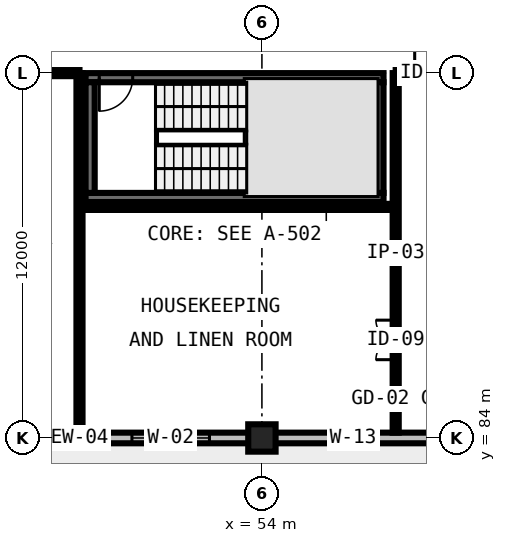
"""IFC4 building model, lengths in metres.
Left out: names, types, materials, properties, quantities, classifications, styles, units other than length and angle.
Written with IfcOpenShell. Run it as: python <this file> out.ifc"""

import sys

from ifc_helpers import new_model, si_unit, direction, frame, frame_2d, origin, origin_2d, place, context, subcontext, project, spatial, rectangle, extrude, element, fill, save


model = new_model("IFC4")
c1 = context("Model", 3, precision=1e-05, world=origin(), true_north=direction((0.0, 1.0)))
c2 = subcontext(c1, "Body", "Model", "MODEL_VIEW")
j1 = project(units=[si_unit("LENGTHUNIT", "METRE"), si_unit("PLANEANGLEUNIT", "RADIAN")], contexts=[c1])
p1 = place(None, origin())
s1 = spatial("IfcSite", under=j1, at=p1, CompositionType="ELEMENT")
p2 = place(p1, origin())
s2 = spatial("IfcBuilding", under=s1, at=p2, CompositionType="ELEMENT")
p3 = place(p2, frame((0.0, 0.0, 27.6)))
s3 = spatial("IfcBuildingStorey", under=s2, at=p3, CompositionType="ELEMENT", Elevation=27.6)
p4 = place(p3, frame((54.0, 84.0, 0.0), z_axis=(0.0, 0.0, 1.0), x_axis=(1.0, 0.0, 0.0)))
e1 = element("IfcColumn", 1, at=p4, inside=s3, PredefinedType="COLUMN", context=c2, shape_type="SweptSolid", body=[
    extrude(rectangle(XDim=0.9, YDim=0.9, at=origin_2d()), origin(), (0.0, 0.0, 1.0), 3.6),
])
p5 = place(p3, frame((48.2, 91.91, 0.0), z_axis=(0.0, 0.0, 1.0), x_axis=(1.0, 0.0, 0.0)))
e2 = element("IfcWall", 2, at=p5, inside=s3, PredefinedType="SHEAR", context=c2, shape_type="SweptSolid", body=[
    extrude(rectangle(XDim=9.8, YDim=0.3, at=frame_2d((4.9, 0.0))), origin(), (0.0, 0.0, 1.0), 3.6),
])
p6 = place(p3, frame((58.0, 95.85, 0.0), z_axis=(0.0, 0.0, 1.0), x_axis=(-1.0, 0.0, 0.0)))
e3 = element("IfcWall", 3, at=p6, inside=s3, PredefinedType="SHEAR", context=c2, shape_type="SweptSolid", body=[
    extrude(rectangle(XDim=9.8, YDim=0.3, at=frame_2d((4.9, 0.0))), origin(), (0.0, 0.0, 1.0), 3.6),
])
p7 = place(p6, frame((8.25, 0.0, 0.0)))
e4 = element("IfcOpeningElement", 4, at=p7, cuts=e3, PredefinedType="OPENING", context=c2, shape_type="SweptSolid", body=[
    extrude(rectangle(XDim=1.1, YDim=2.2, at=frame_2d((0.55, 1.1))), frame((0.0, 0.165, 0.0), z_axis=(0.0, -1.0, 0.0), x_axis=(1.0, 0.0, 0.0)), (0.0, 0.0, 1.0), 0.33),
])
for number, where, z_axis, x_axis in (
    (5, (48.35, 95.7, 0.0), (0.0, 0.0, 1.0), (0.0, -1.0, 0.0)),
    (6, (57.85, 92.06, 0.0), (0.0, 0.0, 1.0), (0.0, 1.0, 0.0)),
):
    element("IfcWall", number, at=place(p3, frame(where, z_axis=z_axis, x_axis=x_axis)), inside=s3, PredefinedType="SHEAR", context=c2, shape_type="SweptSolid", body=[
        extrude(rectangle(XDim=3.64, YDim=0.3, at=frame_2d((1.82, 0.0))), origin(), (0.0, 0.0, 1.0), 3.6),
    ])
p8 = place(p3, frame((42.0, 84.0, 0.0), z_axis=(0.0, 0.0, 1.0), x_axis=(1.0, 0.0, 0.0)))
e7 = element("IfcWall", 7, at=p8, inside=s3, PredefinedType="STANDARD", context=c2, shape_type="SweptSolid", body=[
    extrude(rectangle(XDim=12.0, YDim=0.35, at=frame_2d((6.0, 0.0))), origin(), (0.0, 0.0, 1.0), 2.486),
])
p9 = place(p8, frame((2.1, 0.0, 0.0)))
e8 = element("IfcOpeningElement", 8, at=p9, cuts=e7, PredefinedType="OPENING", context=c2, shape_type="SweptSolid", body=[
    extrude(rectangle(XDim=1.8, YDim=2.2, at=frame_2d((0.9, 1.1))), frame((0.0, 0.19, 0.0), z_axis=(0.0, -1.0, 0.0), x_axis=(1.0, 0.0, 0.0)), (0.0, 0.0, 1.0), 0.38),
])
p10 = place(p8, frame((7.725, 0.0, 0.75)))
e9 = element("IfcOpeningElement", 9, at=p10, cuts=e7, PredefinedType="OPENING", context=c2, shape_type="SweptSolid", body=[
    extrude(rectangle(XDim=2.55, YDim=1.65, at=frame_2d((1.275, 0.825))), frame((0.0, 0.19, 0.0), z_axis=(0.0, -1.0, 0.0), x_axis=(1.0, 0.0, 0.0)), (0.0, 0.0, 1.0), 0.38),
])
p11 = place(p3, frame((54.0, 84.0, 0.0), z_axis=(0.0, 0.0, 1.0), x_axis=(1.0, 0.0, 0.0)))
e10 = element("IfcWall", 10, at=p11, inside=s3, PredefinedType="STANDARD", context=c2, shape_type="SweptSolid", body=[
    extrude(rectangle(XDim=12.0, YDim=0.35, at=frame_2d((6.0, 0.0))), origin(), (0.0, 0.0, 1.0), 2.486),
])
p12 = place(p11, frame((2.3, 0.0, 1.0)))
e11 = element("IfcOpeningElement", 11, at=p12, cuts=e10, PredefinedType="OPENING", context=c2, shape_type="SweptSolid", body=[
    extrude(rectangle(XDim=1.4, YDim=1.4, at=frame_2d((0.7, 0.7))), frame((0.0, 0.19, 0.0), z_axis=(0.0, -1.0, 0.0), x_axis=(1.0, 0.0, 0.0)), (0.0, 0.0, 1.0), 0.38),
])
p13 = place(p11, frame((8.25, 0.0, 1.0)))
e12 = element("IfcOpeningElement", 12, at=p13, cuts=e10, PredefinedType="OPENING", context=c2, shape_type="SweptSolid", body=[
    extrude(rectangle(XDim=1.5, YDim=1.35, at=frame_2d((0.75, 0.675))), frame((0.0, 0.19, 0.0), z_axis=(0.0, -1.0, 0.0), x_axis=(1.0, 0.0, 0.0)), (0.0, 0.0, 1.0), 0.38),
])
p14 = place(p3, frame((58.4, 96.0, 0.0), z_axis=(0.0, 0.0, 1.0), x_axis=(1.0, 0.0, 0.0)))
e13 = element("IfcWall", 13, at=p14, inside=s3, PredefinedType="PARTITIONING", context=c2, shape_type="SweptSolid", body=[
    extrude(rectangle(XDim=2.4, YDim=0.2, at=frame_2d((1.2, 0.0))), origin(), (0.0, 0.0, 1.0), 2.359),
])
p15 = place(p14, frame((0.625, 0.0, 0.0)))
e14 = element("IfcOpeningElement", 14, at=p15, cuts=e13, PredefinedType="OPENING", context=c2, shape_type="SweptSolid", body=[
    extrude(rectangle(XDim=0.95, YDim=2.15, at=frame_2d((0.475, 1.075))), frame((0.0, 0.115, 0.0), z_axis=(0.0, -1.0, 0.0), x_axis=(1.0, 0.0, 0.0)), (0.0, 0.0, 1.0), 0.23),
])
p16 = place(p3, frame((58.4, 84.175, 0.0), z_axis=(0.0, 0.0, 1.0), x_axis=(0.0, 1.0, 0.0)))
e15 = element("IfcWall", 15, at=p16, inside=s3, PredefinedType="PARTITIONING", context=c2, shape_type="SweptSolid", body=[
    extrude(rectangle(XDim=11.825, YDim=0.2, at=frame_2d((5.913, 0.0))), origin(), (0.0, 0.0, 1.0), 3.29),
])
p17 = place(p16, frame((2.4, 0.0, 0.0)))
e16 = element("IfcOpeningElement", 16, at=p17, cuts=e15, PredefinedType="OPENING", context=c2, shape_type="SweptSolid", body=[
    extrude(rectangle(XDim=1.3, YDim=2.2, at=frame_2d((0.65, 1.1))), frame((0.0, 0.115, 0.0), z_axis=(0.0, -1.0, 0.0), x_axis=(1.0, 0.0, 0.0)), (0.0, 0.0, 1.0), 0.23),
])
p18 = place(p3, frame((48.0, 91.6, 0.0), z_axis=(0.0, 0.0, 1.0), x_axis=(1.0, 0.0, 0.0)))
e17 = element("IfcWall", 17, at=p18, inside=s3, PredefinedType="PARTITIONING", context=c2, shape_type="SweptSolid", body=[
    extrude(rectangle(XDim=10.4, YDim=0.2, at=frame_2d((5.2, 0.0))), origin(), (0.0, 0.0, 1.0), 3.29),
])
p19 = place(p3, frame((48.0, 84.175, 0.0), z_axis=(0.0, 0.0, 1.0), x_axis=(0.0, 1.0, 0.0)))
e18 = element("IfcWall", 18, at=p19, inside=s3, PredefinedType="PARTITIONING", context=c2, shape_type="SweptSolid", body=[
    extrude(rectangle(XDim=11.825, YDim=0.2, at=frame_2d((5.913, 0.0))), origin(), (0.0, 0.0, 1.0), 3.29),
])
p20 = place(p3, frame((42.0, 96.0, 0.0), z_axis=(0.0, 0.0, 1.0), x_axis=(1.0, 0.0, 0.0)))
e19 = element("IfcWall", 19, at=p20, inside=s3, PredefinedType="PARTITIONING", context=c2, shape_type="SweptSolid", body=[
    extrude(rectangle(XDim=6.0, YDim=0.2, at=frame_2d((3.0, 0.0))), origin(), (0.0, 0.0, 1.0), 2.359),
])
p21 = place(p20, frame((2.4, 0.0, 0.0)))
e20 = element("IfcOpeningElement", 20, at=p21, cuts=e19, PredefinedType="OPENING", context=c2, shape_type="SweptSolid", body=[
    extrude(rectangle(XDim=1.8, YDim=2.3, at=frame_2d((0.9, 1.15))), frame((0.0, 0.115, 0.0), z_axis=(0.0, -1.0, 0.0), x_axis=(1.0, 0.0, 0.0)), (0.0, 0.0, 1.0), 0.23),
])
p22 = place(p7, origin())
e21 = element("IfcDoor", 21, at=p22, inside=s3, OperationType="SINGLE_SWING_RIGHT", PredefinedType="DOOR", context=c2, shape_type="SweptSolid", body=[
    extrude(rectangle(XDim=1.1, YDim=2.2, at=frame_2d((0.55, 1.1))), frame((0.0, 0.025, 0.0), z_axis=(0.0, -1.0, 0.0), x_axis=(1.0, 0.0, 0.0)), (0.0, 0.0, 1.0), 0.05),
])
fill(e4, e21)
p23 = place(p10, origin())
e22 = element("IfcWindow", 22, at=p23, inside=s3, PartitioningType="DOUBLE_PANEL_VERTICAL", PredefinedType="WINDOW", context=c2, shape_type="SweptSolid", body=[
    extrude(rectangle(XDim=2.55, YDim=1.65, at=frame_2d((1.275, 0.825))), frame((0.0, 0.03, 0.0), z_axis=(0.0, -1.0, 0.0), x_axis=(1.0, 0.0, 0.0)), (0.0, 0.0, 1.0), 0.06),
])
fill(e9, e22)
p24 = place(p12, origin())
e23 = element("IfcWindow", 23, at=p24, inside=s3, PartitioningType="SINGLE_PANEL", PredefinedType="WINDOW", context=c2, shape_type="SweptSolid", body=[
    extrude(rectangle(XDim=1.4, YDim=1.4, at=frame_2d((0.7, 0.7))), frame((0.0, 0.03, 0.0), z_axis=(0.0, -1.0, 0.0), x_axis=(1.0, 0.0, 0.0)), (0.0, 0.0, 1.0), 0.06),
])
fill(e11, e23)
p25 = place(p15, origin())
e24 = element("IfcDoor", 24, at=p25, inside=s3, OperationType="SINGLE_SWING_LEFT", PredefinedType="DOOR", context=c2, shape_type="SweptSolid", body=[
    extrude(rectangle(XDim=0.95, YDim=2.15, at=frame_2d((0.475, 1.075))), frame((0.0, 0.025, 0.0), z_axis=(0.0, -1.0, 0.0), x_axis=(1.0, 0.0, 0.0)), (0.0, 0.0, 1.0), 0.05),
])
fill(e14, e24)
p26 = place(p17, origin())
e25 = element("IfcDoor", 25, at=p26, inside=s3, OperationType="DOUBLE_DOOR_SINGLE_SWING", PredefinedType="DOOR", context=c2, shape_type="SweptSolid", body=[
    extrude(rectangle(XDim=1.3, YDim=2.2, at=frame_2d((0.65, 1.1))), frame((0.0, 0.025, 0.0), z_axis=(0.0, -1.0, 0.0), x_axis=(1.0, 0.0, 0.0)), (0.0, 0.0, 1.0), 0.05),
])
fill(e16, e25)
save(model, sys.argv[1])
